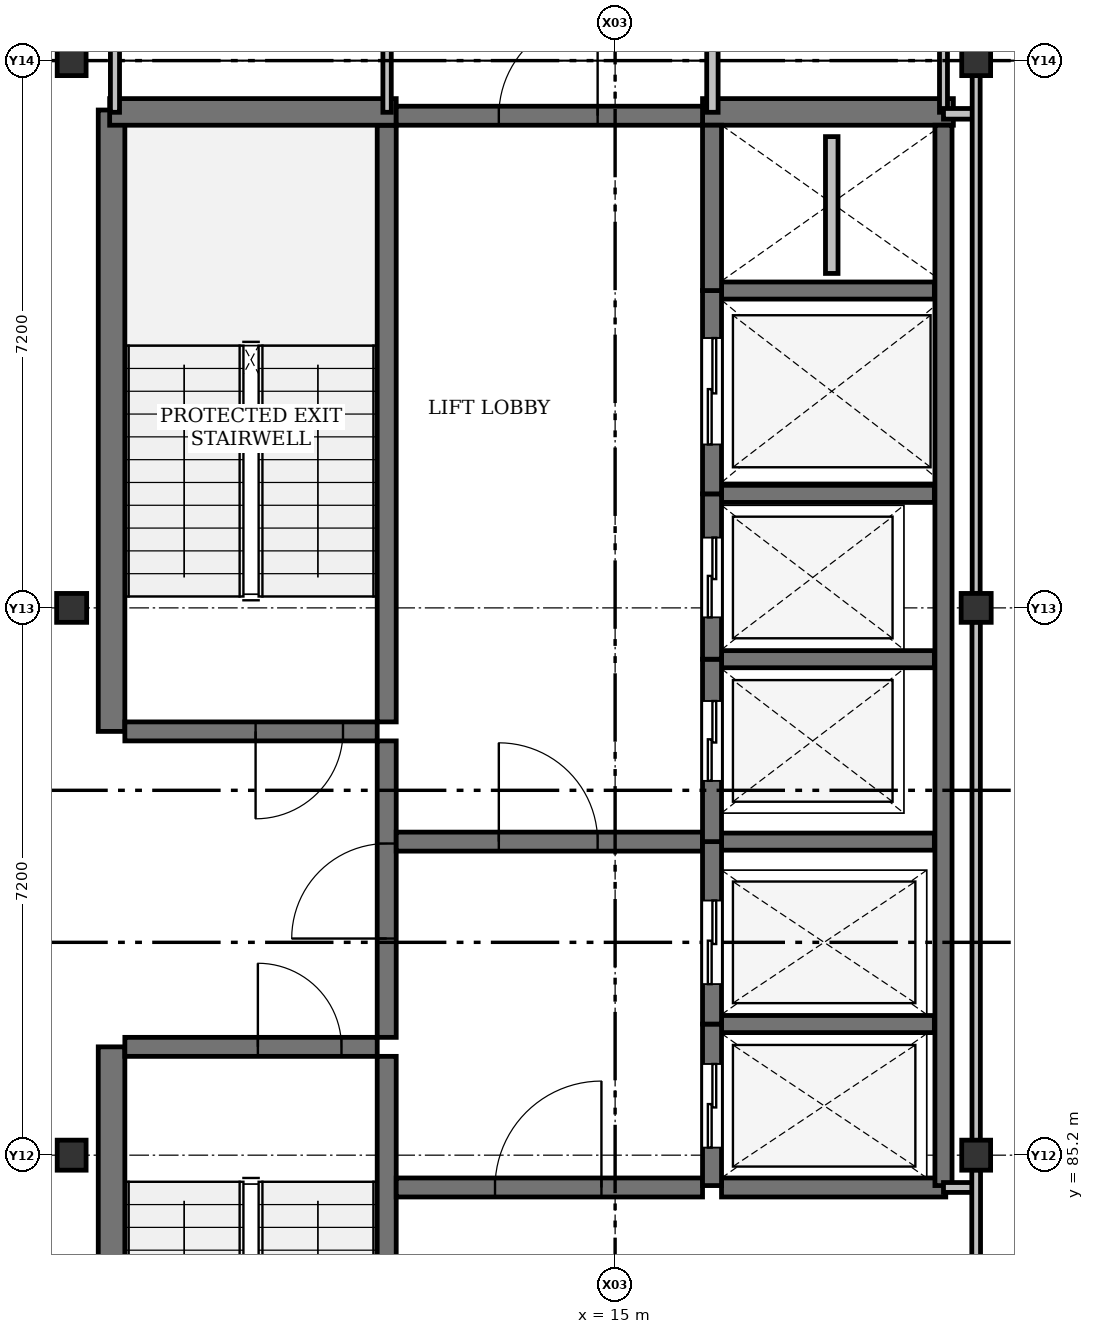
"""IFC4 building model, lengths in metres.
Left out: names, types, materials, properties, quantities, classifications, styles, units other than length and angle.
Written with IfcOpenShell. Run it as: python <this file> out.ifc"""

import sys

from ifc_helpers import new_model, si_unit, direction, frame, frame_2d, origin, origin_2d, place, context, subcontext, project, spatial, rectangle, i_section, extrude, element, fill, save


model = new_model("IFC4")
c1 = context("Model", 3, precision=1e-05, world=origin(), true_north=direction((0.0, 1.0)))
c2 = subcontext(c1, "Body", "Model", "MODEL_VIEW")
j1 = project(units=[si_unit("LENGTHUNIT", "METRE"), si_unit("PLANEANGLEUNIT", "RADIAN")], contexts=[c1])
p1 = place(None, origin())
s1 = spatial("IfcSite", under=j1, at=p1, CompositionType="ELEMENT")
p2 = place(p1, origin())
s2 = spatial("IfcBuilding", under=s1, at=p2, CompositionType="ELEMENT")
p3 = place(p2, frame((0.0, 0.0, 9.9)))
s3 = spatial("IfcBuildingStorey", under=s2, at=p3, CompositionType="ELEMENT", Elevation=9.9)
for number, where, z_axis, x_axis in (
    (1, (7.85, 85.2, 0.0), (0.0, 0.0, 1.0), (0.0, 1.0, 0.0)),
    (2, (19.75, 85.2, 0.0), (0.0, 0.0, 1.0), (0.0, 1.0, 0.0)),
    (3, (7.85, 92.4, 0.0), (0.0, 0.0, 1.0), (1.0, 0.0, 0.0)),
    (4, (19.75, 92.4, 0.0), (0.0, 0.0, 1.0), (1.0, 0.0, 0.0)),
    (5, (7.85, 99.6, 0.0), (0.0, 0.0, 1.0), (0.0, 1.0, 0.0)),
    (6, (19.75, 99.6, 0.0), (0.0, 0.0, 1.0), (0.0, 1.0, 0.0)),
):
    element("IfcColumn", number, at=place(p3, frame(where, z_axis=z_axis, x_axis=x_axis)), inside=s3, PredefinedType="COLUMN", context=c2, shape_type="SweptSolid", body=[
        extrude(i_section(OverallWidth=0.395, OverallDepth=0.38, WebThickness=0.019, FlangeThickness=0.03, FilletRadius=0.015, at=origin_2d()), origin(), (0.0, 0.0, 1.0), 4.2),
    ])
for number, where, z_axis, x_axis in (
    (7, (8.375, 78.45, 0.0), (0.0, 0.0, 1.0), (0.0, 1.0, 0.0)),
    (8, (8.375, 90.775, 0.0), (0.0, 0.0, 1.0), (0.0, 1.0, 0.0)),
):
    element("IfcWall", number, at=place(p3, frame(where, z_axis=z_axis, x_axis=x_axis)), inside=s3, PredefinedType="SHEAR", context=c2, shape_type="SweptSolid", body=[
        extrude(rectangle(XDim=8.175, YDim=0.35, at=frame_2d((4.087, 0.0))), origin(), (0.0, 0.0, 1.0), 4.2),
    ])
for number, where, z_axis, x_axis in (
    (9, (11.995, 78.65, 0.0), (0.0, 0.0, 1.0), (0.0, 1.0, 0.0)),
    (10, (11.995, 90.9, 0.0), (0.0, 0.0, 1.0), (0.0, 1.0, 0.0)),
):
    element("IfcWall", number, at=place(p3, frame(where, z_axis=z_axis, x_axis=x_axis)), inside=s3, PredefinedType="SHEAR", context=c2, shape_type="SweptSolid", body=[
        extrude(rectangle(XDim=7.85, YDim=0.25, at=frame_2d((3.925, 0.0))), origin(), (0.0, 0.0, 1.0), 4.2),
    ])
p4 = place(p3, frame((11.995, 86.75, 0.0), z_axis=(0.0, 0.0, 1.0), x_axis=(0.0, 1.0, 0.0)))
e11 = element("IfcWall", 11, at=p4, inside=s3, PredefinedType="SHEAR", context=c2, shape_type="SweptSolid", body=[
    extrude(rectangle(XDim=3.9, YDim=0.25, at=frame_2d((1.95, 0.0))), origin(), (0.0, 0.0, 1.0), 4.2),
])
p5 = place(p4, frame((1.3, 0.0, 0.0)))
e12 = element("IfcOpeningElement", 12, at=p5, cuts=e11, PredefinedType="OPENING", context=c2, shape_type="SweptSolid", body=[
    extrude(rectangle(XDim=1.25, YDim=2.2, at=frame_2d((0.625, 1.1))), frame((0.0, 0.125, 0.0), z_axis=(0.0, -1.0, 0.0), x_axis=(1.0, 0.0, 0.0)), (0.0, 0.0, 1.0), 0.25),
])
p6 = place(p3, frame((8.35, 98.925, 0.0), z_axis=(0.0, 0.0, 1.0), x_axis=(1.0, 0.0, 0.0)))
e13 = element("IfcWall", 13, at=p6, inside=s3, PredefinedType="SHEAR", context=c2, shape_type="SweptSolid", body=[
    extrude(rectangle(XDim=3.77, YDim=0.35, at=frame_2d((1.885, 0.0))), origin(), (0.0, 0.0, 1.0), 4.2),
])
p7 = place(p3, frame((16.15, 98.925, 0.0), z_axis=(0.0, 0.0, 1.0), x_axis=(1.0, 0.0, 0.0)))
e14 = element("IfcWall", 14, at=p7, inside=s3, PredefinedType="SHEAR", context=c2, shape_type="SweptSolid", body=[
    extrude(rectangle(XDim=3.3, YDim=0.35, at=frame_2d((1.65, 0.0))), origin(), (0.0, 0.0, 1.0), 4.2),
])
p8 = place(p3, frame((12.12, 98.875, 0.0), z_axis=(0.0, 0.0, 1.0), x_axis=(1.0, 0.0, 0.0)))
e15 = element("IfcWall", 15, at=p8, inside=s3, PredefinedType="SHEAR", context=c2, shape_type="SweptSolid", body=[
    extrude(rectangle(XDim=4.03, YDim=0.25, at=frame_2d((2.015, 0.0))), origin(), (0.0, 0.0, 1.0), 4.2),
])
p9 = place(p8, frame((1.35, 0.0, 0.0)))
e16 = element("IfcOpeningElement", 16, at=p9, cuts=e15, PredefinedType="OPENING", context=c2, shape_type="SweptSolid", body=[
    extrude(rectangle(XDim=1.3, YDim=2.2, at=frame_2d((0.65, 1.1))), frame((0.0, 0.125, 0.0), z_axis=(0.0, -1.0, 0.0), x_axis=(1.0, 0.0, 0.0)), (0.0, 0.0, 1.0), 0.25),
])
p10 = place(p3, frame((8.55, 86.625, 0.0), z_axis=(0.0, 0.0, 1.0), x_axis=(1.0, 0.0, 0.0)))
e17 = element("IfcWall", 17, at=p10, inside=s3, PredefinedType="SHEAR", context=c2, shape_type="SweptSolid", body=[
    extrude(rectangle(XDim=3.32, YDim=0.25, at=frame_2d((1.66, 0.0))), origin(), (0.0, 0.0, 1.0), 4.2),
])
p11 = place(p10, frame((1.75, 0.0, 0.0)))
e18 = element("IfcOpeningElement", 18, at=p11, cuts=e17, PredefinedType="OPENING", context=c2, shape_type="SweptSolid", body=[
    extrude(rectangle(XDim=1.1, YDim=2.15, at=frame_2d((0.55, 1.075))), frame((0.0, 0.125, 0.0), z_axis=(0.0, -1.0, 0.0), x_axis=(1.0, 0.0, 0.0)), (0.0, 0.0, 1.0), 0.25),
])
p12 = place(p3, frame((11.87, 90.775, 0.0), z_axis=(0.0, 0.0, 1.0), x_axis=(-1.0, 0.0, 0.0)))
e19 = element("IfcWall", 19, at=p12, inside=s3, PredefinedType="SHEAR", context=c2, shape_type="SweptSolid", body=[
    extrude(rectangle(XDim=3.32, YDim=0.25, at=frame_2d((1.66, 0.0))), origin(), (0.0, 0.0, 1.0), 4.2),
])
p13 = place(p12, frame((0.45, 0.0, 0.0)))
e20 = element("IfcOpeningElement", 20, at=p13, cuts=e19, PredefinedType="OPENING", context=c2, shape_type="SweptSolid", body=[
    extrude(rectangle(XDim=1.15, YDim=2.15, at=frame_2d((0.575, 1.075))), frame((0.0, 0.125, 0.0), z_axis=(0.0, -1.0, 0.0), x_axis=(1.0, 0.0, 0.0)), (0.0, 0.0, 1.0), 0.25),
])
p14 = place(p3, frame((12.12, 89.325, 0.0), z_axis=(0.0, 0.0, 1.0), x_axis=(1.0, 0.0, 0.0)))
e21 = element("IfcWall", 21, at=p14, inside=s3, PredefinedType="SHEAR", context=c2, shape_type="SweptSolid", body=[
    extrude(rectangle(XDim=4.03, YDim=0.25, at=frame_2d((2.015, 0.0))), origin(), (0.0, 0.0, 1.0), 4.2),
])
p15 = place(p14, frame((1.35, 0.0, 0.0)))
e22 = element("IfcOpeningElement", 22, at=p15, cuts=e21, PredefinedType="OPENING", context=c2, shape_type="SweptSolid", body=[
    extrude(rectangle(XDim=1.3, YDim=2.2, at=frame_2d((0.65, 1.1))), frame((0.0, 0.125, 0.0), z_axis=(0.0, -1.0, 0.0), x_axis=(1.0, 0.0, 0.0)), (0.0, 0.0, 1.0), 0.25),
])
p16 = place(p3, frame((12.12, 84.775, 0.0), z_axis=(0.0, 0.0, 1.0), x_axis=(1.0, 0.0, 0.0)))
e23 = element("IfcWall", 23, at=p16, inside=s3, PredefinedType="SHEAR", context=c2, shape_type="SweptSolid", body=[
    extrude(rectangle(XDim=4.03, YDim=0.25, at=frame_2d((2.015, 0.0))), origin(), (0.0, 0.0, 1.0), 4.2),
])
p17 = place(p16, frame((1.3, 0.0, 0.0)))
e24 = element("IfcOpeningElement", 24, at=p17, cuts=e23, PredefinedType="OPENING", context=c2, shape_type="SweptSolid", body=[
    extrude(rectangle(XDim=1.4, YDim=2.25, at=frame_2d((0.7, 1.125))), frame((0.0, 0.125, 0.0), z_axis=(0.0, -1.0, 0.0), x_axis=(1.0, 0.0, 0.0)), (0.0, 0.0, 1.0), 0.25),
])
p18 = place(p3, frame((16.4, 84.775, 0.0), z_axis=(0.0, 0.0, 1.0), x_axis=(1.0, 0.0, 0.0)))
e25 = element("IfcWall", 25, at=p18, inside=s3, PredefinedType="SHEAR", context=c2, shape_type="SweptSolid", body=[
    extrude(rectangle(XDim=2.95, YDim=0.25, at=frame_2d((1.475, 0.0))), origin(), (0.0, 0.0, 1.0), 4.2),
])
p19 = place(p3, frame((19.32, 84.8, 0.0), z_axis=(0.0, 0.0, 1.0), x_axis=(0.0, 1.0, 0.0)))
e26 = element("IfcWall", 26, at=p19, inside=s3, PredefinedType="SHEAR", context=c2, shape_type="SweptSolid", body=[
    extrude(rectangle(XDim=13.95, YDim=0.225, at=frame_2d((6.975, 0.0))), origin(), (0.0, 0.0, 1.0), 4.2),
])
for number, where, z_axis, x_axis in (
    (27, (16.4, 86.925, 0.0), (0.0, 0.0, 1.0), (1.0, 0.0, 0.0)),
    (28, (16.4, 89.325, 0.0), (0.0, 0.0, 1.0), (1.0, 0.0, 0.0)),
    (29, (16.4, 91.725, 0.0), (0.0, 0.0, 1.0), (1.0, 0.0, 0.0)),
    (30, (16.4, 93.9, 0.0), (0.0, 0.0, 1.0), (1.0, 0.0, 0.0)),
    (31, (16.4, 96.575, 0.0), (0.0, 0.0, 1.0), (1.0, 0.0, 0.0)),
):
    element("IfcWall", number, at=place(p3, frame(where, z_axis=z_axis, x_axis=x_axis)), inside=s3, PredefinedType="SHEAR", context=c2, shape_type="SweptSolid", body=[
        extrude(rectangle(XDim=2.8, YDim=0.225, at=frame_2d((1.4, 0.0))), origin(), (0.0, 0.0, 1.0), 4.2),
    ])
p20 = place(p3, frame((16.275, 84.8, 0.0), z_axis=(0.0, 0.0, 1.0), x_axis=(0.0, 1.0, 0.0)))
e32 = element("IfcWall", 32, at=p20, inside=s3, PredefinedType="SHEAR", context=c2, shape_type="SweptSolid", body=[
    extrude(rectangle(XDim=2.125, YDim=0.25, at=frame_2d((1.062, 0.0))), origin(), (0.0, 0.0, 1.0), 4.2),
])
p21 = place(p20, frame((0.5, 0.0, 0.0)))
e33 = element("IfcOpeningElement", 33, at=p21, cuts=e32, PredefinedType="OPENING", context=c2, shape_type="SweptSolid", body=[
    extrude(rectangle(XDim=1.1, YDim=2.15, at=frame_2d((0.55, 1.075))), frame((0.0, 0.125, 0.0), z_axis=(0.0, -1.0, 0.0), x_axis=(1.0, 0.0, 0.0)), (0.0, 0.0, 1.0), 0.25),
])
p22 = place(p3, frame((16.275, 86.925, 0.0), z_axis=(0.0, 0.0, 1.0), x_axis=(0.0, 1.0, 0.0)))
e34 = element("IfcWall", 34, at=p22, inside=s3, PredefinedType="SHEAR", context=c2, shape_type="SweptSolid", body=[
    extrude(rectangle(XDim=2.4, YDim=0.25, at=frame_2d((1.2, 0.0))), origin(), (0.0, 0.0, 1.0), 4.2),
])
p23 = place(p22, frame((0.525, 0.0, 0.0)))
e35 = element("IfcOpeningElement", 35, at=p23, cuts=e34, PredefinedType="OPENING", context=c2, shape_type="SweptSolid", body=[
    extrude(rectangle(XDim=1.1, YDim=2.15, at=frame_2d((0.55, 1.075))), frame((0.0, 0.125, 0.0), z_axis=(0.0, -1.0, 0.0), x_axis=(1.0, 0.0, 0.0)), (0.0, 0.0, 1.0), 0.25),
])
p24 = place(p3, frame((16.275, 89.325, 0.0), z_axis=(0.0, 0.0, 1.0), x_axis=(0.0, 1.0, 0.0)))
e36 = element("IfcWall", 36, at=p24, inside=s3, PredefinedType="SHEAR", context=c2, shape_type="SweptSolid", body=[
    extrude(rectangle(XDim=2.4, YDim=0.25, at=frame_2d((1.2, 0.0))), origin(), (0.0, 0.0, 1.0), 4.2),
])
p25 = place(p24, frame((0.8, 0.0, 0.0)))
e37 = element("IfcOpeningElement", 37, at=p25, cuts=e36, PredefinedType="OPENING", context=c2, shape_type="SweptSolid", body=[
    extrude(rectangle(XDim=1.05, YDim=2.15, at=frame_2d((0.525, 1.075))), frame((0.0, 0.125, 0.0), z_axis=(0.0, -1.0, 0.0), x_axis=(1.0, 0.0, 0.0)), (0.0, 0.0, 1.0), 0.25),
])
p26 = place(p3, frame((16.275, 91.725, 0.0), z_axis=(0.0, 0.0, 1.0), x_axis=(0.0, 1.0, 0.0)))
e38 = element("IfcWall", 38, at=p26, inside=s3, PredefinedType="SHEAR", context=c2, shape_type="SweptSolid", body=[
    extrude(rectangle(XDim=2.175, YDim=0.25, at=frame_2d((1.087, 0.0))), origin(), (0.0, 0.0, 1.0), 4.2),
])
p27 = place(p26, frame((0.55, 0.0, 0.0)))
e39 = element("IfcOpeningElement", 39, at=p27, cuts=e38, PredefinedType="OPENING", context=c2, shape_type="SweptSolid", body=[
    extrude(rectangle(XDim=1.05, YDim=2.15, at=frame_2d((0.525, 1.075))), frame((0.0, 0.125, 0.0), z_axis=(0.0, -1.0, 0.0), x_axis=(1.0, 0.0, 0.0)), (0.0, 0.0, 1.0), 0.25),
])
p28 = place(p3, frame((16.275, 93.9, 0.0), z_axis=(0.0, 0.0, 1.0), x_axis=(0.0, 1.0, 0.0)))
e40 = element("IfcWall", 40, at=p28, inside=s3, PredefinedType="SHEAR", context=c2, shape_type="SweptSolid", body=[
    extrude(rectangle(XDim=2.675, YDim=0.25, at=frame_2d((1.337, 0.0))), origin(), (0.0, 0.0, 1.0), 4.2),
])
p29 = place(p28, frame((0.65, 0.0, 0.0)))
e41 = element("IfcOpeningElement", 41, at=p29, cuts=e40, PredefinedType="OPENING", context=c2, shape_type="SweptSolid", body=[
    extrude(rectangle(XDim=1.4, YDim=2.25, at=frame_2d((0.7, 1.125))), frame((0.0, 0.125, 0.0), z_axis=(0.0, -1.0, 0.0), x_axis=(1.0, 0.0, 0.0)), (0.0, 0.0, 1.0), 0.25),
])
p30 = place(p3, frame((16.275, 96.575, 0.0), z_axis=(0.0, 0.0, 1.0), x_axis=(0.0, 1.0, 0.0)))
e42 = element("IfcWall", 42, at=p30, inside=s3, PredefinedType="SHEAR", context=c2, shape_type="SweptSolid", body=[
    extrude(rectangle(XDim=2.175, YDim=0.25, at=frame_2d((1.087, 0.0))), origin(), (0.0, 0.0, 1.0), 4.2),
])
p31 = place(p3, frame((17.85, 96.8, 0.0), z_axis=(0.0, 0.0, 1.0), x_axis=(0.0, 1.0, 0.0)))
e43 = element("IfcWall", 43, at=p31, inside=s3, PredefinedType="PLUMBINGWALL", context=c2, shape_type="SweptSolid", body=[
    extrude(rectangle(XDim=1.8, YDim=0.165, at=frame_2d((0.9, 0.0))), origin(), (0.0, 0.0, 1.0), 4.2),
])
p32 = place(p3, frame((8.42, 98.92, 0.0), z_axis=(0.0, 0.0, 1.0), x_axis=(0.0, 1.0, 0.0)))
e44 = element("IfcWall", 44, at=p32, inside=s3, PredefinedType="PARTITIONING", context=c2, shape_type="SweptSolid", body=[
    extrude(rectangle(XDim=2.74, YDim=0.12, at=frame_2d((1.37, 0.0))), origin(), (0.0, 0.0, 1.0), 3.466),
])
p33 = place(p3, frame((12.0, 101.6, 0.0), z_axis=(0.0, 0.0, 1.0), x_axis=(0.0, -1.0, 0.0)))
e45 = element("IfcWall", 45, at=p33, inside=s3, PredefinedType="PARTITIONING", context=c2, shape_type="SweptSolid", body=[
    extrude(rectangle(XDim=2.68, YDim=0.11, at=frame_2d((1.34, 0.0))), origin(), (0.0, 0.0, 1.0), 3.466),
])
p34 = place(p33, frame((0.82, 0.0, 0.0)))
e46 = element("IfcOpeningElement", 46, at=p34, cuts=e45, PredefinedType="OPENING", context=c2, shape_type="SweptSolid", body=[
    extrude(rectangle(XDim=1.04, YDim=2.15, at=frame_2d((0.52, 1.075))), frame((0.0, 0.055, 0.0), z_axis=(0.0, -1.0, 0.0), x_axis=(1.0, 0.0, 0.0)), (0.0, 0.0, 1.0), 0.11),
])
p35 = place(p3, frame((19.32, 98.92, 0.0), z_axis=(0.0, 0.0, 1.0), x_axis=(0.0, 1.0, 0.0)))
e47 = element("IfcWall", 47, at=p35, inside=s3, PredefinedType="PARTITIONING", context=c2, shape_type="SweptSolid", body=[
    extrude(rectangle(XDim=2.74, YDim=0.105, at=frame_2d((1.37, 0.0))), origin(), (0.0, 0.0, 1.0), 3.466),
])
p36 = place(p3, frame((16.28, 98.92, 0.0), z_axis=(0.0, 0.0, 1.0), x_axis=(0.0, 1.0, 0.0)))
e48 = element("IfcWall", 48, at=p36, inside=s3, PredefinedType="PARTITIONING", context=c2, shape_type="SweptSolid", body=[
    extrude(rectangle(XDim=2.68, YDim=0.15, at=frame_2d((1.34, 0.0))), origin(), (0.0, 0.0, 1.0), 3.466),
])
p37 = place(p36, frame((0.865, 0.0, 0.0)))
e49 = element("IfcOpeningElement", 49, at=p37, cuts=e48, PredefinedType="OPENING", context=c2, shape_type="SweptSolid", body=[
    extrude(rectangle(XDim=0.95, YDim=2.2, at=frame_2d((0.475, 1.1))), frame((0.0, 0.075, 0.0), z_axis=(0.0, -1.0, 0.0), x_axis=(1.0, 0.0, 0.0)), (0.0, 0.0, 1.0), 0.15),
])
p38 = place(p3, frame((19.75, 98.9, 0.0), z_axis=(0.0, 0.0, 1.0), x_axis=(-1.0, 0.0, 0.0)))
e50 = element("IfcWall", 50, at=p38, inside=s3, PredefinedType="PARTITIONING", context=c2, shape_type="SweptSolid", body=[
    extrude(rectangle(XDim=0.43, YDim=0.14, at=frame_2d((0.215, 0.0))), origin(), (0.0, 0.0, 1.0), 3.542),
])
p39 = place(p3, frame((19.32, 84.775, 0.0), z_axis=(0.0, 0.0, 1.0), x_axis=(1.0, 0.0, 0.0)))
e51 = element("IfcWall", 51, at=p39, inside=s3, PredefinedType="PARTITIONING", context=c2, shape_type="SweptSolid", body=[
    extrude(rectangle(XDim=0.43, YDim=0.13, at=frame_2d((0.215, 0.0))), origin(), (0.0, 0.0, 1.0), 3.542),
])
p40 = place(p3, frame((19.75, 78.185, 0.0), z_axis=(0.0, 0.0, 1.0), x_axis=(0.0, 1.0, 0.0)))
e52 = element("IfcWall", 52, at=p40, inside=s3, PredefinedType="PARTITIONING", context=c2, shape_type="SweptSolid", body=[
    extrude(rectangle(XDim=6.823, YDim=0.115, at=frame_2d((3.411, 0.0))), origin(), (0.0, 0.0, 1.0), 3.542),
])
p41 = place(p3, frame((19.75, 85.393, 0.0), z_axis=(0.0, 0.0, 1.0), x_axis=(0.0, 1.0, 0.0)))
e53 = element("IfcWall", 53, at=p41, inside=s3, PredefinedType="PARTITIONING", context=c2, shape_type="SweptSolid", body=[
    extrude(rectangle(XDim=6.823, YDim=0.11, at=frame_2d((3.411, 0.0))), origin(), (0.0, 0.0, 1.0), 3.542),
])
p42 = place(p3, frame((19.75, 92.585, 0.0), z_axis=(0.0, 0.0, 1.0), x_axis=(0.0, 1.0, 0.0)))
e54 = element("IfcWall", 54, at=p42, inside=s3, PredefinedType="PARTITIONING", context=c2, shape_type="SweptSolid", body=[
    extrude(rectangle(XDim=6.823, YDim=0.105, at=frame_2d((3.411, 0.0))), origin(), (0.0, 0.0, 1.0), 3.542),
])
p43 = place(p5, origin())
e55 = element("IfcDoor", 55, at=p43, inside=s3, OperationType="SINGLE_SWING_LEFT", PredefinedType="DOOR", context=c2, shape_type="SweptSolid", body=[
    extrude(rectangle(XDim=1.25, YDim=2.2, at=frame_2d((0.625, 1.1))), frame((0.0, 0.025, 0.0), z_axis=(0.0, -1.0, 0.0), x_axis=(1.0, 0.0, 0.0)), (0.0, 0.0, 1.0), 0.05),
])
fill(e12, e55)
p44 = place(p9, origin())
e56 = element("IfcDoor", 56, at=p44, inside=s3, OperationType="SINGLE_SWING_RIGHT", PredefinedType="DOOR", context=c2, shape_type="SweptSolid", body=[
    extrude(rectangle(XDim=1.3, YDim=2.2, at=frame_2d((0.65, 1.1))), frame((0.0, 0.025, 0.0), z_axis=(0.0, -1.0, 0.0), x_axis=(1.0, 0.0, 0.0)), (0.0, 0.0, 1.0), 0.05),
])
fill(e16, e56)
p45 = place(p11, origin())
e57 = element("IfcDoor", 57, at=p45, inside=s3, OperationType="SINGLE_SWING_LEFT", PredefinedType="DOOR", context=c2, shape_type="SweptSolid", body=[
    extrude(rectangle(XDim=1.1, YDim=2.15, at=frame_2d((0.55, 1.075))), frame((0.0, 0.025, 0.0), z_axis=(0.0, -1.0, 0.0), x_axis=(1.0, 0.0, 0.0)), (0.0, 0.0, 1.0), 0.05),
])
fill(e18, e57)
p46 = place(p13, origin())
e58 = element("IfcDoor", 58, at=p46, inside=s3, OperationType="SINGLE_SWING_RIGHT", PredefinedType="DOOR", context=c2, shape_type="SweptSolid", body=[
    extrude(rectangle(XDim=1.15, YDim=2.15, at=frame_2d((0.575, 1.075))), frame((0.0, 0.025, 0.0), z_axis=(0.0, -1.0, 0.0), x_axis=(1.0, 0.0, 0.0)), (0.0, 0.0, 1.0), 0.05),
])
fill(e20, e58)
p47 = place(p15, origin())
e59 = element("IfcDoor", 59, at=p47, inside=s3, OperationType="SINGLE_SWING_LEFT", PredefinedType="DOOR", context=c2, shape_type="SweptSolid", body=[
    extrude(rectangle(XDim=1.3, YDim=2.2, at=frame_2d((0.65, 1.1))), frame((0.0, 0.025, 0.0), z_axis=(0.0, -1.0, 0.0), x_axis=(1.0, 0.0, 0.0)), (0.0, 0.0, 1.0), 0.05),
])
fill(e22, e59)
p48 = place(p17, origin())
e60 = element("IfcDoor", 60, at=p48, inside=s3, OperationType="SINGLE_SWING_RIGHT", PredefinedType="DOOR", context=c2, shape_type="SweptSolid", body=[
    extrude(rectangle(XDim=1.4, YDim=2.25, at=frame_2d((0.7, 1.125))), frame((0.0, 0.025, 0.0), z_axis=(0.0, -1.0, 0.0), x_axis=(1.0, 0.0, 0.0)), (0.0, 0.0, 1.0), 0.05),
])
fill(e24, e60)
p49 = place(p21, origin())
e61 = element("IfcDoor", 61, at=p49, inside=s3, OperationType="SLIDING_TO_LEFT", PredefinedType="DOOR", context=c2, shape_type="SweptSolid", body=[
    extrude(rectangle(XDim=1.1, YDim=2.15, at=frame_2d((0.55, 1.075))), frame((0.0, 0.025, 0.0), z_axis=(0.0, -1.0, 0.0), x_axis=(1.0, 0.0, 0.0)), (0.0, 0.0, 1.0), 0.05),
])
fill(e33, e61)
p50 = place(p23, origin())
e62 = element("IfcDoor", 62, at=p50, inside=s3, OperationType="SLIDING_TO_LEFT", PredefinedType="DOOR", context=c2, shape_type="SweptSolid", body=[
    extrude(rectangle(XDim=1.1, YDim=2.15, at=frame_2d((0.55, 1.075))), frame((0.0, 0.025, 0.0), z_axis=(0.0, -1.0, 0.0), x_axis=(1.0, 0.0, 0.0)), (0.0, 0.0, 1.0), 0.05),
])
fill(e35, e62)
p51 = place(p25, origin())
e63 = element("IfcDoor", 63, at=p51, inside=s3, OperationType="SLIDING_TO_LEFT", PredefinedType="DOOR", context=c2, shape_type="SweptSolid", body=[
    extrude(rectangle(XDim=1.05, YDim=2.15, at=frame_2d((0.525, 1.075))), frame((0.0, 0.025, 0.0), z_axis=(0.0, -1.0, 0.0), x_axis=(1.0, 0.0, 0.0)), (0.0, 0.0, 1.0), 0.05),
])
fill(e37, e63)
p52 = place(p27, origin())
e64 = element("IfcDoor", 64, at=p52, inside=s3, OperationType="SLIDING_TO_LEFT", PredefinedType="DOOR", context=c2, shape_type="SweptSolid", body=[
    extrude(rectangle(XDim=1.05, YDim=2.15, at=frame_2d((0.525, 1.075))), frame((0.0, 0.025, 0.0), z_axis=(0.0, -1.0, 0.0), x_axis=(1.0, 0.0, 0.0)), (0.0, 0.0, 1.0), 0.05),
])
fill(e39, e64)
p53 = place(p29, origin())
e65 = element("IfcDoor", 65, at=p53, inside=s3, OperationType="SLIDING_TO_LEFT", PredefinedType="DOOR", context=c2, shape_type="SweptSolid", body=[
    extrude(rectangle(XDim=1.4, YDim=2.25, at=frame_2d((0.7, 1.125))), frame((0.0, 0.025, 0.0), z_axis=(0.0, -1.0, 0.0), x_axis=(1.0, 0.0, 0.0)), (0.0, 0.0, 1.0), 0.05),
])
fill(e41, e65)
save(model, sys.argv[1])
